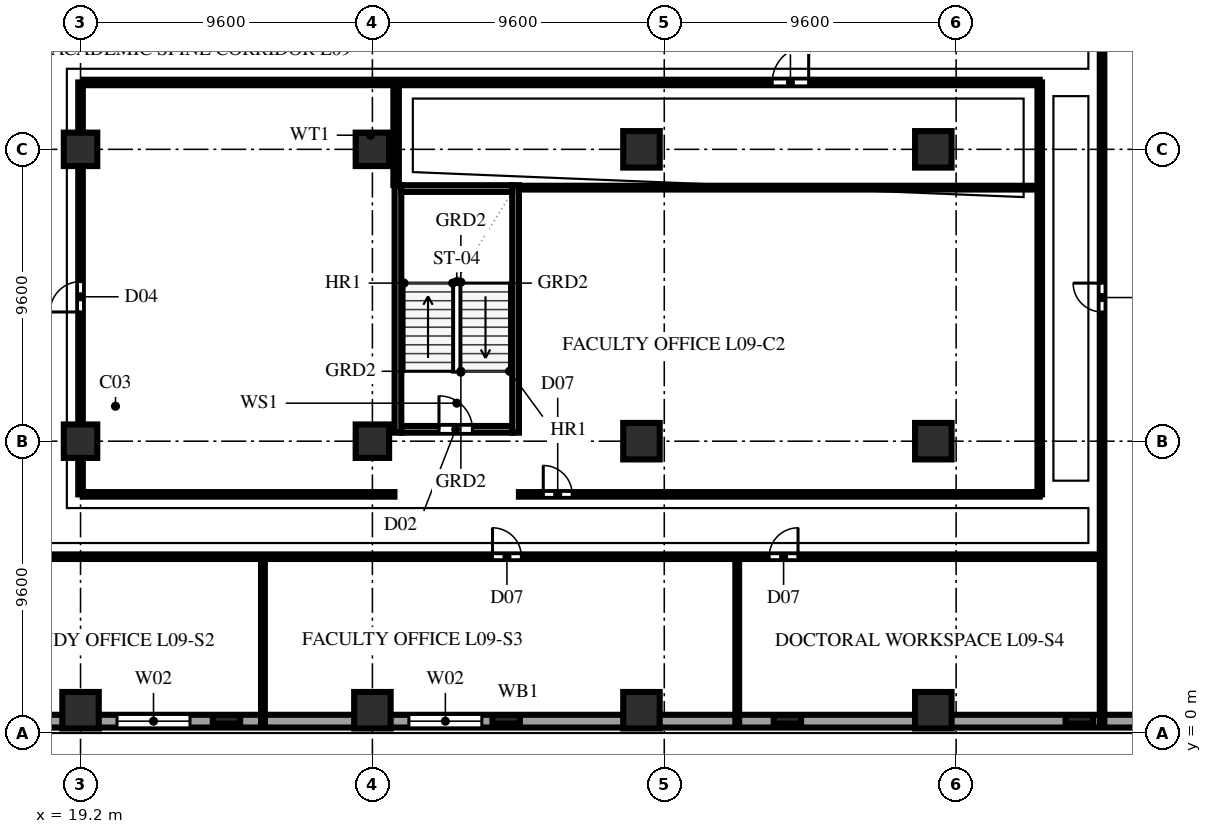
"""IFC4 building model, lengths in metres.
Left out: names, types, materials, properties, quantities, classifications, styles, units other than length and angle.
Written with IfcOpenShell. Run it as: python <this file> out.ifc"""

import sys

from ifc_helpers import new_model, si_unit, direction, frame, frame_2d, origin, origin_2d, place, context, subcontext, project, spatial, rectangle, extrude, element, fill, save


model = new_model("IFC4")
c1 = context("Model", 3, precision=1e-05, world=origin(), true_north=direction((0.0, 1.0)))
c2 = subcontext(c1, "Body", "Model", "MODEL_VIEW")
j1 = project(units=[si_unit("LENGTHUNIT", "METRE"), si_unit("PLANEANGLEUNIT", "RADIAN")], contexts=[c1])
p1 = place(None, origin())
s1 = spatial("IfcSite", under=j1, at=p1, CompositionType="ELEMENT")
p2 = place(p1, origin())
s2 = spatial("IfcBuilding", under=s1, at=p2, CompositionType="ELEMENT")
p3 = place(p2, frame((0.0, 0.0, 39.4)))
s3 = spatial("IfcBuildingStorey", under=s2, at=p3, CompositionType="ELEMENT", Elevation=39.4)
p4 = place(p3, frame((19.2, 0.75, 0.0), z_axis=(0.0, 0.0, 1.0), x_axis=(1.0, 0.0, 0.0)))
e1 = element("IfcColumn", 1, at=p4, inside=s3, PredefinedType="COLUMN", context=c2, shape_type="SweptSolid", body=[
    extrude(rectangle(XDim=1.2, YDim=1.2, at=origin_2d()), origin(), (0.0, 0.0, 1.0), 3.8),
])
for number, where, z_axis, x_axis in (
    (2, (19.2, 9.6, 0.0), (0.0, 0.0, 1.0), (1.0, 0.0, 0.0)),
    (3, (19.2, 19.2, 0.0), (0.0, 0.0, 1.0), (1.0, 0.0, 0.0)),
):
    element("IfcColumn", number, at=place(p3, frame(where, z_axis=z_axis, x_axis=x_axis)), inside=s3, PredefinedType="COLUMN", context=c2, shape_type="SweptSolid", body=[
        extrude(rectangle(XDim=1.1, YDim=1.1, at=origin_2d()), origin(), (0.0, 0.0, 1.0), 3.8),
    ])
p5 = place(p3, frame((28.8, 0.75, 0.0), z_axis=(0.0, 0.0, 1.0), x_axis=(1.0, 0.0, 0.0)))
e4 = element("IfcColumn", 4, at=p5, inside=s3, PredefinedType="COLUMN", context=c2, shape_type="SweptSolid", body=[
    extrude(rectangle(XDim=1.2, YDim=1.2, at=origin_2d()), origin(), (0.0, 0.0, 1.0), 3.8),
])
for number, where, z_axis, x_axis in (
    (5, (28.8, 9.6, 0.0), (0.0, 0.0, 1.0), (1.0, 0.0, 0.0)),
    (6, (28.8, 19.2, 0.0), (0.0, 0.0, 1.0), (1.0, 0.0, 0.0)),
):
    element("IfcColumn", number, at=place(p3, frame(where, z_axis=z_axis, x_axis=x_axis)), inside=s3, PredefinedType="COLUMN", context=c2, shape_type="SweptSolid", body=[
        extrude(rectangle(XDim=1.1, YDim=1.1, at=origin_2d()), origin(), (0.0, 0.0, 1.0), 3.8),
    ])
for number, where, z_axis, x_axis in (
    (7, (37.65, 0.75, 0.0), (0.0, 0.0, 1.0), (1.0, 0.0, 0.0)),
    (8, (37.65, 9.6, 0.0), (0.0, 0.0, 1.0), (1.0, 0.0, 0.0)),
    (9, (37.65, 19.2, 0.0), (0.0, 0.0, 1.0), (1.0, 0.0, 0.0)),
    (10, (47.25, 0.75, 0.0), (0.0, 0.0, 1.0), (1.0, 0.0, 0.0)),
    (11, (47.25, 9.6, 0.0), (0.0, 0.0, 1.0), (1.0, 0.0, 0.0)),
    (12, (47.25, 19.2, 0.0), (0.0, 0.0, 1.0), (1.0, 0.0, 0.0)),
):
    element("IfcColumn", number, at=place(p3, frame(where, z_axis=z_axis, x_axis=x_axis)), inside=s3, PredefinedType="COLUMN", context=c2, shape_type="SweptSolid", body=[
        extrude(rectangle(XDim=1.2, YDim=1.2, at=origin_2d()), origin(), (0.0, 0.0, 1.0), 3.8),
    ])
for number, where, z_axis, x_axis in (
    (13, (24.0, 0.45, 0.0), (0.0, 0.0, 1.0), (1.0, 0.0, 0.0)),
    (14, (33.2, 0.45, 0.0), (0.0, 0.0, 1.0), (1.0, 0.0, 0.0)),
    (15, (42.45, 0.45, 0.0), (0.0, 0.0, 1.0), (1.0, 0.0, 0.0)),
    (16, (52.05, 0.45, 0.0), (0.0, 0.0, 1.0), (1.0, 0.0, 0.0)),
):
    element("IfcColumn", number, at=place(p3, frame(where, z_axis=z_axis, x_axis=x_axis)), inside=s3, PredefinedType="PILASTER", context=c2, shape_type="SweptSolid", body=[
        extrude(rectangle(XDim=0.9, YDim=0.28, at=origin_2d()), origin(), (0.0, 0.0, 1.0), 3.8),
    ])
p6 = place(p3, frame((1.84, 0.39, 0.0), z_axis=(0.0, 0.0, 1.0), x_axis=(1.0, 0.0, 0.0)))
e17 = element("IfcWall", 17, at=p6, inside=s3, PredefinedType="SOLIDWALL", context=c2, shape_type="SweptSolid", body=[
    extrude(rectangle(XDim=63.52, YDim=0.42, at=frame_2d((31.76, 0.0))), origin(), (0.0, 0.0, 1.0), 3.54),
])
p7 = place(p6, frame((4.16, 0.0, 0.85)))
e18 = element("IfcOpeningElement", 18, at=p7, cuts=e17, PredefinedType="OPENING", context=c2, shape_type="SweptSolid", body=[
    extrude(rectangle(XDim=2.4, YDim=1.85, at=frame_2d((1.2, 0.925))), frame((0.0, 0.222, 0.0), z_axis=(0.0, -1.0, 0.0), x_axis=(1.0, 0.0, 0.0)), (0.0, 0.0, 1.0), 0.444),
])
p8 = place(p6, frame((13.76, 0.0, 0.85)))
e19 = element("IfcOpeningElement", 19, at=p8, cuts=e17, PredefinedType="OPENING", context=c2, shape_type="SweptSolid", body=[
    extrude(rectangle(XDim=2.4, YDim=1.85, at=frame_2d((1.2, 0.925))), frame((0.0, 0.222, 0.0), z_axis=(0.0, -1.0, 0.0), x_axis=(1.0, 0.0, 0.0)), (0.0, 0.0, 1.0), 0.444),
])
p9 = place(p6, frame((18.56, 0.0, 0.85)))
e20 = element("IfcOpeningElement", 20, at=p9, cuts=e17, PredefinedType="OPENING", context=c2, shape_type="SweptSolid", body=[
    extrude(rectangle(XDim=2.4, YDim=1.85, at=frame_2d((1.2, 0.925))), frame((0.0, 0.222, 0.0), z_axis=(0.0, -1.0, 0.0), x_axis=(1.0, 0.0, 0.0)), (0.0, 0.0, 1.0), 0.444),
])
p10 = place(p6, frame((28.16, 0.0, 0.85)))
e21 = element("IfcOpeningElement", 21, at=p10, cuts=e17, PredefinedType="OPENING", context=c2, shape_type="SweptSolid", body=[
    extrude(rectangle(XDim=2.4, YDim=1.85, at=frame_2d((1.2, 0.925))), frame((0.0, 0.222, 0.0), z_axis=(0.0, -1.0, 0.0), x_axis=(1.0, 0.0, 0.0)), (0.0, 0.0, 1.0), 0.444),
])
p11 = place(p3, frame((29.75, 9.99, 0.0), z_axis=(0.0, 0.0, 1.0), x_axis=(1.0, 0.0, 0.0)))
e22 = element("IfcWall", 22, at=p11, inside=s3, PredefinedType="SOLIDWALL", context=c2, shape_type="SweptSolid", body=[
    extrude(rectangle(XDim=3.65, YDim=0.22, at=frame_2d((1.825, 0.0))), origin(), (0.0, 0.0, 1.0), 3.54),
])
p12 = place(p11, frame((1.24, 0.0, 0.0)))
e23 = element("IfcOpeningElement", 23, at=p12, cuts=e22, PredefinedType="OPENING", context=c2, shape_type="SweptSolid", body=[
    extrude(rectangle(XDim=1.1, YDim=2.2, at=frame_2d((0.55, 1.1))), frame((0.0, 0.122, 0.0), z_axis=(0.0, -1.0, 0.0), x_axis=(1.0, 0.0, 0.0)), (0.0, 0.0, 1.0), 0.244),
])
for number, where, z_axis, x_axis in (
    (24, (29.64, 9.88, 0.0), (0.0, 0.0, 1.0), (0.0, 1.0, 0.0)),
    (25, (33.51, 9.88, 0.0), (0.0, 0.0, 1.0), (0.0, 1.0, 0.0)),
):
    element("IfcWall", number, at=place(p3, frame(where, z_axis=z_axis, x_axis=x_axis)), inside=s3, PredefinedType="SOLIDWALL", context=c2, shape_type="SweptSolid", body=[
        extrude(rectangle(XDim=8.14, YDim=0.22, at=frame_2d((4.07, 0.0))), origin(), (0.0, 0.0, 1.0), 3.54),
    ])
p13 = place(p3, frame((29.75, 17.91, 0.0), z_axis=(0.0, 0.0, 1.0), x_axis=(1.0, 0.0, 0.0)))
e26 = element("IfcWall", 26, at=p13, inside=s3, PredefinedType="SOLIDWALL", context=c2, shape_type="SweptSolid", body=[
    extrude(rectangle(XDim=3.65, YDim=0.22, at=frame_2d((1.825, 0.0))), origin(), (0.0, 0.0, 1.0), 3.54),
])
for number, where, z_axis, x_axis in (
    (27, (25.2, 0.22, 0.0), (0.0, 0.0, 1.0), (0.0, 1.0, 0.0)),
    (28, (40.8, 0.22, 0.0), (0.0, 0.0, 1.0), (0.0, 1.0, 0.0)),
):
    element("IfcWall", number, at=place(p3, frame(where, z_axis=z_axis, x_axis=x_axis)), inside=s3, PredefinedType="PARTITIONING", context=c2, shape_type="SweptSolid", body=[
        extrude(rectangle(XDim=5.58, YDim=0.125, at=frame_2d((2.79, 0.0))), origin(), (0.0, 0.0, 1.0), 3.54),
    ])
p14 = place(p3, frame((0.22, 5.8, 0.0), z_axis=(0.0, 0.0, 1.0), x_axis=(1.0, 0.0, 0.0)))
e29 = element("IfcWall", 29, at=p14, inside=s3, PredefinedType="PARTITIONING", context=c2, shape_type="SweptSolid", body=[
    extrude(rectangle(XDim=52.58, YDim=0.15, at=frame_2d((26.29, 0.0))), origin(), (0.0, 0.0, 1.0), 3.54),
])
p15 = place(p14, frame((10.18, 0.0, 0.0)))
e30 = element("IfcOpeningElement", 30, at=p15, cuts=e29, PredefinedType="OPENING", context=c2, shape_type="SweptSolid", body=[
    extrude(rectangle(XDim=0.95, YDim=2.15, at=frame_2d((0.475, 1.075))), frame((0.0, 0.087, 0.0), z_axis=(0.0, -1.0, 0.0), x_axis=(1.0, 0.0, 0.0)), (0.0, 0.0, 1.0), 0.174),
])
p16 = place(p14, frame((13.58, 0.0, 0.0)))
e31 = element("IfcOpeningElement", 31, at=p16, cuts=e29, PredefinedType="OPENING", context=c2, shape_type="SweptSolid", body=[
    extrude(rectangle(XDim=0.95, YDim=2.15, at=frame_2d((0.475, 1.075))), frame((0.0, 0.087, 0.0), z_axis=(0.0, -1.0, 0.0), x_axis=(1.0, 0.0, 0.0)), (0.0, 0.0, 1.0), 0.174),
])
p17 = place(p14, frame((32.53, 0.0, 0.0)))
e32 = element("IfcOpeningElement", 32, at=p17, cuts=e29, PredefinedType="OPENING", context=c2, shape_type="SweptSolid", body=[
    extrude(rectangle(XDim=0.95, YDim=2.15, at=frame_2d((0.475, 1.075))), frame((0.0, 0.087, 0.0), z_axis=(0.0, -1.0, 0.0), x_axis=(1.0, 0.0, 0.0)), (0.0, 0.0, 1.0), 0.174),
])
p18 = place(p14, frame((41.63, 0.0, 0.0)))
e33 = element("IfcOpeningElement", 33, at=p18, cuts=e29, PredefinedType="OPENING", context=c2, shape_type="SweptSolid", body=[
    extrude(rectangle(XDim=0.95, YDim=2.15, at=frame_2d((0.475, 1.075))), frame((0.0, 0.087, 0.0), z_axis=(0.0, -1.0, 0.0), x_axis=(1.0, 0.0, 0.0)), (0.0, 0.0, 1.0), 0.174),
])
p19 = place(p3, frame((52.8, 0.22, 0.0), z_axis=(0.0, 0.0, 1.0), x_axis=(0.0, 1.0, 0.0)))
e34 = element("IfcWall", 34, at=p19, inside=s3, PredefinedType="PARTITIONING", context=c2, shape_type="SweptSolid", body=[
    extrude(rectangle(XDim=37.96, YDim=0.15, at=frame_2d((18.98, 0.0))), origin(), (0.0, 0.0, 1.0), 3.54),
])
p20 = place(p19, frame((13.63, 0.0, 0.0)))
e35 = element("IfcOpeningElement", 35, at=p20, cuts=e34, PredefinedType="OPENING", context=c2, shape_type="SweptSolid", body=[
    extrude(rectangle(XDim=0.95, YDim=2.15, at=frame_2d((0.475, 1.075))), frame((0.0, 0.087, 0.0), z_axis=(0.0, -1.0, 0.0), x_axis=(1.0, 0.0, 0.0)), (0.0, 0.0, 1.0), 0.174),
])
p21 = place(p3, frame((19.2, 7.85, 0.0), z_axis=(0.0, 0.0, 1.0), x_axis=(0.0, 1.0, 0.0)))
e36 = element("IfcWall", 36, at=p21, inside=s3, PredefinedType="PARTITIONING", context=c2, shape_type="SweptSolid", body=[
    extrude(rectangle(XDim=13.55, YDim=0.15, at=frame_2d((6.775, 0.0))), origin(), (0.0, 0.0, 1.0), 3.123),
])
p22 = place(p21, frame((6.0, 0.0, 0.0)))
e37 = element("IfcOpeningElement", 37, at=p22, cuts=e36, PredefinedType="OPENING", context=c2, shape_type="SweptSolid", body=[
    extrude(rectangle(XDim=1.0, YDim=2.2, at=frame_2d((0.5, 1.1))), frame((0.0, 0.087, 0.0), z_axis=(0.0, -1.0, 0.0), x_axis=(1.0, 0.0, 0.0)), (0.0, 0.0, 1.0), 0.174),
])
p23 = place(p3, frame((29.58, 18.025, 0.0), z_axis=(0.0, 0.0, 1.0), x_axis=(0.0, 1.0, 0.0)))
e38 = element("IfcWall", 38, at=p23, inside=s3, PredefinedType="PARTITIONING", context=c2, shape_type="SweptSolid", body=[
    extrude(rectangle(XDim=3.28, YDim=0.18, at=frame_2d((1.64, 0.0))), origin(), (0.0, 0.0, 1.0), 3.54),
])
p24 = place(p3, frame((19.28, 21.4, 0.0), z_axis=(0.0, 0.0, 1.0), x_axis=(1.0, 0.0, 0.0)))
e39 = element("IfcWall", 39, at=p24, inside=s3, PredefinedType="PARTITIONING", context=c2, shape_type="SweptSolid", body=[
    extrude(rectangle(XDim=31.47, YDim=0.18, at=frame_2d((15.735, 0.0))), origin(), (0.0, 0.0, 1.0), 3.54),
])
p25 = place(p24, frame((22.67, 0.0, 0.0)))
e40 = element("IfcOpeningElement", 40, at=p25, cuts=e39, PredefinedType="OPENING", context=c2, shape_type="SweptSolid", body=[
    extrude(rectangle(XDim=1.2, YDim=2.2, at=frame_2d((0.6, 1.1))), frame((0.0, 0.102, 0.0), z_axis=(0.0, -1.0, 0.0), x_axis=(1.0, 0.0, 0.0)), (0.0, 0.0, 1.0), 0.204),
])
p26 = place(p3, frame((19.28, 7.85, 0.0), z_axis=(0.0, 0.0, 1.0), x_axis=(1.0, 0.0, 0.0)))
e41 = element("IfcWall", 41, at=p26, inside=s3, PredefinedType="PARTITIONING", context=c2, shape_type="SweptSolid", body=[
    extrude(rectangle(XDim=10.245, YDim=0.15, at=frame_2d((5.123, 0.0))), origin(), (0.0, 0.0, 1.0), 3.54),
])
p27 = place(p3, frame((33.62, 17.94, 0.0), z_axis=(0.0, 0.0, 1.0), x_axis=(1.0, 0.0, 0.0)))
e42 = element("IfcWall", 42, at=p27, inside=s3, PredefinedType="PARTITIONING", context=c2, shape_type="SweptSolid", body=[
    extrude(rectangle(XDim=17.13, YDim=0.125, at=frame_2d((8.565, 0.0))), origin(), (0.0, 0.0, 1.0), 3.54),
])
p28 = place(p3, frame((33.62, 7.85, 0.0), z_axis=(0.0, 0.0, 1.0), x_axis=(1.0, 0.0, 0.0)))
e43 = element("IfcWall", 43, at=p28, inside=s3, PredefinedType="PARTITIONING", context=c2, shape_type="SweptSolid", body=[
    extrude(rectangle(XDim=17.13, YDim=0.15, at=frame_2d((8.565, 0.0))), origin(), (0.0, 0.0, 1.0), 3.54),
])
p29 = place(p28, frame((0.8, 0.0, 0.0)))
e44 = element("IfcOpeningElement", 44, at=p29, cuts=e43, PredefinedType="OPENING", context=c2, shape_type="SweptSolid", body=[
    extrude(rectangle(XDim=0.95, YDim=2.15, at=frame_2d((0.475, 1.075))), frame((0.0, 0.087, 0.0), z_axis=(0.0, -1.0, 0.0), x_axis=(1.0, 0.0, 0.0)), (0.0, 0.0, 1.0), 0.174),
])
p30 = place(p3, frame((50.75, 7.85, 0.0), z_axis=(0.0, 0.0, 1.0), x_axis=(0.0, 1.0, 0.0)))
e45 = element("IfcWall", 45, at=p30, inside=s3, PredefinedType="PARTITIONING", context=c2, shape_type="SweptSolid", body=[
    extrude(rectangle(XDim=13.55, YDim=0.15, at=frame_2d((6.775, 0.0))), origin(), (0.0, 0.0, 1.0), 3.54),
])
p31 = place(p9, origin())
e46 = element("IfcWindow", 46, at=p31, inside=s3, PartitioningType="TRIPLE_PANEL_VERTICAL", PredefinedType="WINDOW", context=c2, shape_type="SweptSolid", body=[
    extrude(rectangle(XDim=2.4, YDim=1.85, at=frame_2d((1.2, 0.925))), frame((0.0, 0.11, 0.0), z_axis=(0.0, -1.0, 0.0), x_axis=(1.0, 0.0, 0.0)), (0.0, 0.0, 1.0), 0.06),
])
fill(e20, e46)
p32 = place(p10, origin())
e47 = element("IfcWindow", 47, at=p32, inside=s3, PartitioningType="TRIPLE_PANEL_VERTICAL", PredefinedType="WINDOW", context=c2, shape_type="SweptSolid", body=[
    extrude(rectangle(XDim=2.4, YDim=1.85, at=frame_2d((1.2, 0.925))), frame((0.0, 0.11, 0.0), z_axis=(0.0, -1.0, 0.0), x_axis=(1.0, 0.0, 0.0)), (0.0, 0.0, 1.0), 0.06),
])
fill(e21, e47)
p33 = place(p12, origin())
e48 = element("IfcDoor", 48, at=p33, inside=s3, OperationType="SINGLE_SWING_LEFT", PredefinedType="DOOR", context=c2, shape_type="SweptSolid", body=[
    extrude(rectangle(XDim=1.1, YDim=2.2, at=frame_2d((0.55, 1.1))), frame((0.0, 0.025, 0.0), z_axis=(0.0, -1.0, 0.0), x_axis=(1.0, 0.0, 0.0)), (0.0, 0.0, 1.0), 0.05),
])
fill(e23, e48)
p34 = place(p17, origin())
e49 = element("IfcDoor", 49, at=p34, inside=s3, OperationType="SINGLE_SWING_LEFT", PredefinedType="DOOR", context=c2, shape_type="SweptSolid", body=[
    extrude(rectangle(XDim=0.95, YDim=2.15, at=frame_2d((0.475, 1.075))), frame((0.0, 0.025, 0.0), z_axis=(0.0, -1.0, 0.0), x_axis=(1.0, 0.0, 0.0)), (0.0, 0.0, 1.0), 0.05),
])
fill(e32, e49)
p35 = place(p18, origin())
e50 = element("IfcDoor", 50, at=p35, inside=s3, OperationType="SINGLE_SWING_RIGHT", PredefinedType="DOOR", context=c2, shape_type="SweptSolid", body=[
    extrude(rectangle(XDim=0.95, YDim=2.15, at=frame_2d((0.475, 1.075))), frame((0.0, 0.025, 0.0), z_axis=(0.0, -1.0, 0.0), x_axis=(1.0, 0.0, 0.0)), (0.0, 0.0, 1.0), 0.05),
])
fill(e33, e50)
p36 = place(p20, origin())
e51 = element("IfcDoor", 51, at=p36, inside=s3, OperationType="SINGLE_SWING_RIGHT", PredefinedType="DOOR", context=c2, shape_type="SweptSolid", body=[
    extrude(rectangle(XDim=0.95, YDim=2.15, at=frame_2d((0.475, 1.075))), frame((0.0, 0.025, 0.0), z_axis=(0.0, -1.0, 0.0), x_axis=(1.0, 0.0, 0.0)), (0.0, 0.0, 1.0), 0.05),
])
fill(e35, e51)
p37 = place(p22, origin())
e52 = element("IfcDoor", 52, at=p37, inside=s3, OperationType="SINGLE_SWING_LEFT", PredefinedType="DOOR", context=c2, shape_type="SweptSolid", body=[
    extrude(rectangle(XDim=1.0, YDim=2.2, at=frame_2d((0.5, 1.1))), frame((0.0, 0.025, 0.0), z_axis=(0.0, -1.0, 0.0), x_axis=(1.0, 0.0, 0.0)), (0.0, 0.0, 1.0), 0.05),
])
fill(e37, e52)
p38 = place(p25, origin())
e53 = element("IfcDoor", 53, at=p38, inside=s3, OperationType="SINGLE_SWING_RIGHT", PredefinedType="DOOR", context=c2, shape_type="SweptSolid", body=[
    extrude(rectangle(XDim=1.2, YDim=2.2, at=frame_2d((0.6, 1.1))), frame((0.0, 0.025, 0.0), z_axis=(0.0, -1.0, 0.0), x_axis=(1.0, 0.0, 0.0)), (0.0, 0.0, 1.0), 0.05),
])
fill(e40, e53)
p39 = place(p29, origin())
e54 = element("IfcDoor", 54, at=p39, inside=s3, OperationType="SINGLE_SWING_LEFT", PredefinedType="DOOR", context=c2, shape_type="SweptSolid", body=[
    extrude(rectangle(XDim=0.95, YDim=2.15, at=frame_2d((0.475, 1.075))), frame((0.0, 0.025, 0.0), z_axis=(0.0, -1.0, 0.0), x_axis=(1.0, 0.0, 0.0)), (0.0, 0.0, 1.0), 0.05),
])
fill(e44, e54)
save(model, sys.argv[1])
